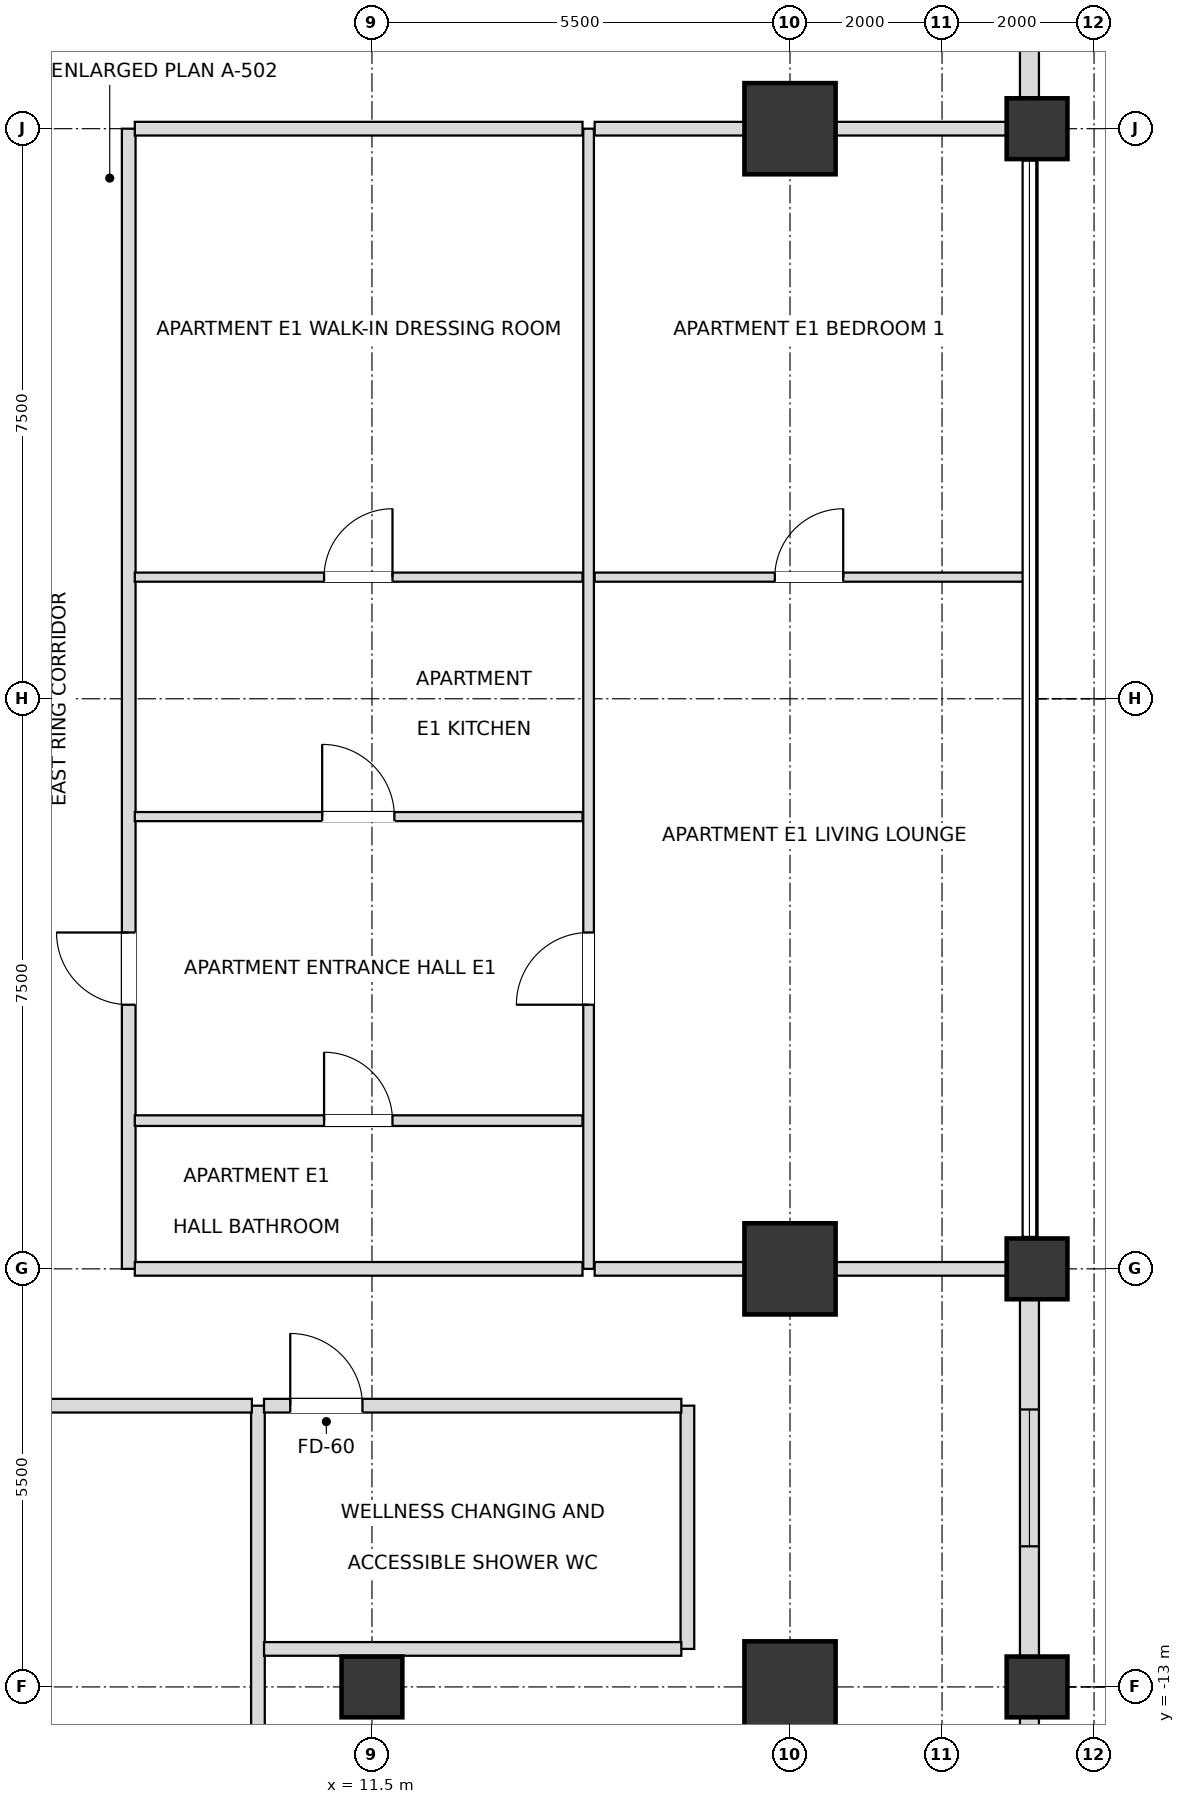
"""IFC4 building model, lengths in metres.
Left out: names, types, materials, properties, quantities, classifications, styles, units other than length and angle.
Written with IfcOpenShell. Run it as: python <this file> out.ifc"""

import sys

from ifc_helpers import new_model, si_unit, direction, frame, frame_2d, origin, origin_2d, place, context, subcontext, project, spatial, rectangle, extrude, element, fill, save


model = new_model("IFC4")
c1 = context("Model", 3, precision=1e-05, world=origin(), true_north=direction((0.0, 1.0)))
c2 = subcontext(c1, "Body", "Model", "MODEL_VIEW")
j1 = project(units=[si_unit("LENGTHUNIT", "METRE"), si_unit("PLANEANGLEUNIT", "RADIAN")], contexts=[c1])
p1 = place(None, origin())
s1 = spatial("IfcSite", under=j1, at=p1, CompositionType="ELEMENT")
p2 = place(p1, origin())
s2 = spatial("IfcBuilding", under=s1, at=p2, CompositionType="ELEMENT")
p3 = place(p2, frame((0.0, 0.0, 109.8)))
s3 = spatial("IfcBuildingStorey", under=s2, at=p3, CompositionType="ELEMENT", Elevation=109.8)
for number, where, z_axis, x_axis in (
    (1, (17.0, -13.0, 0.0), (0.0, 0.0, 1.0), (1.0, 0.0, 0.0)),
    (2, (17.0, -7.5, 0.0), (0.0, 0.0, 1.0), (1.0, 0.0, 0.0)),
    (3, (17.0, 7.5, 0.0), (0.0, 0.0, 1.0), (1.0, 0.0, 0.0)),
):
    element("IfcColumn", number, at=place(p3, frame(where, z_axis=z_axis, x_axis=x_axis)), inside=s3, PredefinedType="USERDEFINED", context=c2, shape_type="SweptSolid", body=[
        extrude(rectangle(XDim=1.2, YDim=1.2, at=origin_2d()), origin(), (0.0, 0.0, 1.0), 3.6),
    ])
for number, where, z_axis, x_axis in (
    (4, (11.5, -13.0, 0.0), (0.0, 0.0, 1.0), (1.0, 0.0, 0.0)),
    (5, (20.25, -13.0, 0.0), (0.0, 0.0, 1.0), (1.0, 0.0, 0.0)),
    (6, (20.25, -7.5, 0.0), (0.0, 0.0, 1.0), (1.0, 0.0, 0.0)),
    (7, (20.25, 7.5, 0.0), (0.0, 0.0, 1.0), (1.0, 0.0, 0.0)),
):
    element("IfcColumn", number, at=place(p3, frame(where, z_axis=z_axis, x_axis=x_axis)), inside=s3, PredefinedType="COLUMN", context=c2, shape_type="SweptSolid", body=[
        extrude(rectangle(XDim=0.8, YDim=0.8, at=origin_2d()), origin(), (0.0, 0.0, 1.0), 3.6),
    ])
p4 = place(p3, frame((20.15, -18.675, 0.0), z_axis=(0.0, 0.0, 1.0), x_axis=(0.0, 1.0, 0.0)))
e8 = element("IfcWall", 8, at=p4, inside=s3, PredefinedType="SOLIDWALL", context=c2, shape_type="SweptSolid", body=[
    extrude(rectangle(XDim=5.28, YDim=0.25, at=frame_2d((2.64, 0.0))), origin(), (0.0, 0.0, 1.0), 2.736),
])
p5 = place(p4, frame((1.718, 0.0, 0.72)))
e9 = element("IfcOpeningElement", 9, at=p5, cuts=e8, PredefinedType="OPENING", context=c2, shape_type="SweptSolid", body=[
    extrude(rectangle(XDim=1.8, YDim=1.68, at=frame_2d((0.9, 0.84))), frame((0.0, 0.135, 0.0), z_axis=(0.0, -1.0, 0.0), x_axis=(1.0, 0.0, 0.0)), (0.0, 0.0, 1.0), 0.27),
])
p6 = place(p3, frame((20.15, -12.605, 0.0), z_axis=(0.0, 0.0, 1.0), x_axis=(0.0, 1.0, 0.0)))
e10 = element("IfcWall", 10, at=p6, inside=s3, PredefinedType="SOLIDWALL", context=c2, shape_type="SweptSolid", body=[
    extrude(rectangle(XDim=4.71, YDim=0.25, at=frame_2d((2.355, 0.0))), origin(), (0.0, 0.0, 1.0), 2.736),
])
p7 = place(p6, frame((1.455, 0.0, 0.72)))
e11 = element("IfcOpeningElement", 11, at=p7, cuts=e10, PredefinedType="OPENING", context=c2, shape_type="SweptSolid", body=[
    extrude(rectangle(XDim=1.8, YDim=1.68, at=frame_2d((0.9, 0.84))), frame((0.0, 0.135, 0.0), z_axis=(0.0, -1.0, 0.0), x_axis=(1.0, 0.0, 0.0)), (0.0, 0.0, 1.0), 0.27),
])
p8 = place(p3, frame((20.15, 7.895, 0.0), z_axis=(0.0, 0.0, 1.0), x_axis=(0.0, 1.0, 0.0)))
e12 = element("IfcWall", 12, at=p8, inside=s3, PredefinedType="SOLIDWALL", context=c2, shape_type="SweptSolid", body=[
    extrude(rectangle(XDim=4.71, YDim=0.25, at=frame_2d((2.355, 0.0))), origin(), (0.0, 0.0, 1.0), 2.736),
])
p9 = place(p8, frame((1.455, 0.0, 0.72)))
e13 = element("IfcOpeningElement", 13, at=p9, cuts=e12, PredefinedType="OPENING", context=c2, shape_type="SweptSolid", body=[
    extrude(rectangle(XDim=1.8, YDim=1.68, at=frame_2d((0.9, 0.84))), frame((0.0, 0.135, 0.0), z_axis=(0.0, -1.0, 0.0), x_axis=(1.0, 0.0, 0.0)), (0.0, 0.0, 1.0), 0.27),
])
p10 = place(p3, frame((8.3, -7.5, 0.0), z_axis=(0.0, 0.0, 1.0), x_axis=(0.0, 1.0, 0.0)))
e14 = element("IfcWall", 14, at=p10, inside=s3, PredefinedType="PARTITIONING", context=c2, shape_type="SweptSolid", body=[
    extrude(rectangle(XDim=15.0, YDim=0.18, at=frame_2d((7.5, 0.0))), origin(), (0.0, 0.0, 1.0), 3.38),
])
p11 = place(p10, frame((3.475, 0.0, 0.0)))
e15 = element("IfcOpeningElement", 15, at=p11, cuts=e14, PredefinedType="OPENING", context=c2, shape_type="SweptSolid", body=[
    extrude(rectangle(XDim=0.95, YDim=2.15, at=frame_2d((0.475, 1.075))), frame((0.0, 0.1, 0.0), z_axis=(0.0, -1.0, 0.0), x_axis=(1.0, 0.0, 0.0)), (0.0, 0.0, 1.0), 0.2),
])
p12 = place(p3, frame((10.0, -23.15, 0.0), z_axis=(0.0, 0.0, 1.0), x_axis=(0.0, 1.0, 0.0)))
e16 = element("IfcWall", 16, at=p12, inside=s3, PredefinedType="PARTITIONING", context=c2, shape_type="SweptSolid", body=[
    extrude(rectangle(XDim=13.85, YDim=0.18, at=frame_2d((6.925, 0.0))), origin(), (0.0, 0.0, 1.0), 2.816),
])
p13 = place(p12, frame((4.855, 0.0, 0.0)))
e17 = element("IfcOpeningElement", 17, at=p13, cuts=e16, PredefinedType="OPENING", context=c2, shape_type="SweptSolid", body=[
    extrude(rectangle(XDim=0.95, YDim=2.15, at=frame_2d((0.475, 1.075))), frame((0.0, 0.1, 0.0), z_axis=(0.0, -1.0, 0.0), x_axis=(1.0, 0.0, 0.0)), (0.0, 0.0, 1.0), 0.2),
])
p14 = place(p3, frame((14.35, -7.5, 0.0), z_axis=(0.0, 0.0, 1.0), x_axis=(0.0, 1.0, 0.0)))
e18 = element("IfcWall", 18, at=p14, inside=s3, PredefinedType="PARTITIONING", context=c2, shape_type="SweptSolid", body=[
    extrude(rectangle(XDim=15.0, YDim=0.14, at=frame_2d((7.5, 0.0))), origin(), (0.0, 0.0, 1.0), 3.38),
])
p15 = place(p14, frame((3.475, 0.0, 0.0)))
e19 = element("IfcOpeningElement", 19, at=p15, cuts=e18, PredefinedType="OPENING", context=c2, shape_type="SweptSolid", body=[
    extrude(rectangle(XDim=0.95, YDim=2.1, at=frame_2d((0.475, 1.05))), frame((0.0, 0.08, 0.0), z_axis=(0.0, -1.0, 0.0), x_axis=(1.0, 0.0, 0.0)), (0.0, 0.0, 1.0), 0.16),
])
p16 = place(p3, frame((15.65, -12.5, 0.0), z_axis=(0.0, 0.0, 1.0), x_axis=(0.0, 1.0, 0.0)))
e20 = element("IfcWall", 20, at=p16, inside=s3, PredefinedType="PARTITIONING", context=c2, shape_type="SweptSolid", body=[
    extrude(rectangle(XDim=3.2, YDim=0.18, at=frame_2d((1.6, 0.0))), origin(), (0.0, 0.0, 1.0), 3.38),
])
p17 = place(p3, frame((10.08, -12.5, 0.0), z_axis=(0.0, 0.0, 1.0), x_axis=(1.0, 0.0, 0.0)))
e21 = element("IfcWall", 21, at=p17, inside=s3, PredefinedType="PARTITIONING", context=c2, shape_type="SweptSolid", body=[
    extrude(rectangle(XDim=5.49, YDim=0.18, at=frame_2d((2.745, 0.0))), origin(), (0.0, 0.0, 1.0), 3.38),
])
p18 = place(p3, frame((-4.92, -9.3, 0.0), z_axis=(0.0, 0.0, 1.0), x_axis=(1.0, 0.0, 0.0)))
e22 = element("IfcWall", 22, at=p18, inside=s3, PredefinedType="PARTITIONING", context=c2, shape_type="SweptSolid", body=[
    extrude(rectangle(XDim=14.84, YDim=0.18, at=frame_2d((7.42, 0.0))), origin(), (0.0, 0.0, 1.0), 2.816),
])
p19 = place(p18, frame((6.945, 0.0, 0.0)))
e23 = element("IfcOpeningElement", 23, at=p19, cuts=e22, PredefinedType="OPENING", context=c2, shape_type="SweptSolid", body=[
    extrude(rectangle(XDim=0.95, YDim=2.15, at=frame_2d((0.475, 1.075))), frame((0.0, 0.1, 0.0), z_axis=(0.0, -1.0, 0.0), x_axis=(1.0, 0.0, 0.0)), (0.0, 0.0, 1.0), 0.2),
])
p20 = place(p3, frame((10.08, -9.3, 0.0), z_axis=(0.0, 0.0, 1.0), x_axis=(1.0, 0.0, 0.0)))
e24 = element("IfcWall", 24, at=p20, inside=s3, PredefinedType="PARTITIONING", context=c2, shape_type="SweptSolid", body=[
    extrude(rectangle(XDim=5.49, YDim=0.18, at=frame_2d((2.745, 0.0))), origin(), (0.0, 0.0, 1.0), 3.38),
])
p21 = place(p20, frame((0.345, 0.0, 0.0)))
e25 = element("IfcOpeningElement", 25, at=p21, cuts=e24, PredefinedType="OPENING", context=c2, shape_type="SweptSolid", body=[
    extrude(rectangle(XDim=0.95, YDim=2.15, at=frame_2d((0.475, 1.075))), frame((0.0, 0.1, 0.0), z_axis=(0.0, -1.0, 0.0), x_axis=(1.0, 0.0, 0.0)), (0.0, 0.0, 1.0), 0.2),
])
p22 = place(p3, frame((8.38, -7.5, 0.0), z_axis=(0.0, 0.0, 1.0), x_axis=(1.0, 0.0, 0.0)))
e26 = element("IfcWall", 26, at=p22, inside=s3, PredefinedType="PARTITIONING", context=c2, shape_type="SweptSolid", body=[
    extrude(rectangle(XDim=5.89, YDim=0.18, at=frame_2d((2.945, 0.0))), origin(), (0.0, 0.0, 1.0), 2.816),
])
p23 = place(p3, frame((14.43, -7.5, 0.0), z_axis=(0.0, 0.0, 1.0), x_axis=(1.0, 0.0, 0.0)))
e27 = element("IfcWall", 27, at=p23, inside=s3, PredefinedType="PARTITIONING", context=c2, shape_type="SweptSolid", body=[
    extrude(rectangle(XDim=5.72, YDim=0.18, at=frame_2d((2.86, 0.0))), origin(), (0.0, 0.0, 1.0), 2.816),
])
p24 = place(p3, frame((8.38, -5.55, 0.0), z_axis=(0.0, 0.0, 1.0), x_axis=(1.0, 0.0, 0.0)))
e28 = element("IfcWall", 28, at=p24, inside=s3, PredefinedType="PARTITIONING", context=c2, shape_type="SweptSolid", body=[
    extrude(rectangle(XDim=5.89, YDim=0.14, at=frame_2d((2.945, 0.0))), origin(), (0.0, 0.0, 1.0), 3.38),
])
p25 = place(p24, frame((2.49, 0.0, 0.0)))
e29 = element("IfcOpeningElement", 29, at=p25, cuts=e28, PredefinedType="OPENING", context=c2, shape_type="SweptSolid", body=[
    extrude(rectangle(XDim=0.9, YDim=2.1, at=frame_2d((0.45, 1.05))), frame((0.0, 0.08, 0.0), z_axis=(0.0, -1.0, 0.0), x_axis=(1.0, 0.0, 0.0)), (0.0, 0.0, 1.0), 0.16),
])
p26 = place(p3, frame((8.38, -1.55, 0.0), z_axis=(0.0, 0.0, 1.0), x_axis=(1.0, 0.0, 0.0)))
e30 = element("IfcWall", 30, at=p26, inside=s3, PredefinedType="PARTITIONING", context=c2, shape_type="SweptSolid", body=[
    extrude(rectangle(XDim=5.89, YDim=0.12, at=frame_2d((2.945, 0.0))), origin(), (0.0, 0.0, 1.0), 3.38),
])
p27 = place(p26, frame((2.465, 0.0, 0.0)))
e31 = element("IfcOpeningElement", 31, at=p27, cuts=e30, PredefinedType="OPENING", context=c2, shape_type="SweptSolid", body=[
    extrude(rectangle(XDim=0.95, YDim=2.1, at=frame_2d((0.475, 1.05))), frame((0.0, 0.07, 0.0), z_axis=(0.0, -1.0, 0.0), x_axis=(1.0, 0.0, 0.0)), (0.0, 0.0, 1.0), 0.14),
])
p28 = place(p3, frame((8.38, 1.6, 0.0), z_axis=(0.0, 0.0, 1.0), x_axis=(1.0, 0.0, 0.0)))
e32 = element("IfcWall", 32, at=p28, inside=s3, PredefinedType="PARTITIONING", context=c2, shape_type="SweptSolid", body=[
    extrude(rectangle(XDim=5.89, YDim=0.12, at=frame_2d((2.945, 0.0))), origin(), (0.0, 0.0, 1.0), 3.38),
])
p29 = place(p28, frame((2.49, 0.0, 0.0)))
e33 = element("IfcOpeningElement", 33, at=p29, cuts=e32, PredefinedType="OPENING", context=c2, shape_type="SweptSolid", body=[
    extrude(rectangle(XDim=0.9, YDim=2.1, at=frame_2d((0.45, 1.05))), frame((0.0, 0.07, 0.0), z_axis=(0.0, -1.0, 0.0), x_axis=(1.0, 0.0, 0.0)), (0.0, 0.0, 1.0), 0.14),
])
p30 = place(p3, frame((14.43, 1.6, 0.0), z_axis=(0.0, 0.0, 1.0), x_axis=(1.0, 0.0, 0.0)))
e34 = element("IfcWall", 34, at=p30, inside=s3, PredefinedType="PARTITIONING", context=c2, shape_type="SweptSolid", body=[
    extrude(rectangle(XDim=5.64, YDim=0.12, at=frame_2d((2.82, 0.0))), origin(), (0.0, 0.0, 1.0), 2.816),
])
p31 = place(p30, frame((2.37, 0.0, 0.0)))
e35 = element("IfcOpeningElement", 35, at=p31, cuts=e34, PredefinedType="OPENING", context=c2, shape_type="SweptSolid", body=[
    extrude(rectangle(XDim=0.9, YDim=2.1, at=frame_2d((0.45, 1.05))), frame((0.0, 0.07, 0.0), z_axis=(0.0, -1.0, 0.0), x_axis=(1.0, 0.0, 0.0)), (0.0, 0.0, 1.0), 0.14),
])
p32 = place(p3, frame((8.38, 7.5, 0.0), z_axis=(0.0, 0.0, 1.0), x_axis=(1.0, 0.0, 0.0)))
e36 = element("IfcWall", 36, at=p32, inside=s3, PredefinedType="PARTITIONING", context=c2, shape_type="SweptSolid", body=[
    extrude(rectangle(XDim=5.89, YDim=0.18, at=frame_2d((2.945, 0.0))), origin(), (0.0, 0.0, 1.0), 2.816),
])
p33 = place(p3, frame((14.43, 7.5, 0.0), z_axis=(0.0, 0.0, 1.0), x_axis=(1.0, 0.0, 0.0)))
e37 = element("IfcWall", 37, at=p33, inside=s3, PredefinedType="PARTITIONING", context=c2, shape_type="SweptSolid", body=[
    extrude(rectangle(XDim=5.72, YDim=0.18, at=frame_2d((2.86, 0.0))), origin(), (0.0, 0.0, 1.0), 2.816),
])
p34 = place(p7, origin())
e38 = element("IfcWindow", 38, at=p34, inside=s3, PartitioningType="SINGLE_PANEL", PredefinedType="WINDOW", context=c2, shape_type="SweptSolid", body=[
    extrude(rectangle(XDim=1.8, YDim=1.68, at=frame_2d((0.9, 0.84))), frame((0.0, 0.03, 0.0), z_axis=(0.0, -1.0, 0.0), x_axis=(1.0, 0.0, 0.0)), (0.0, 0.0, 1.0), 0.06),
])
fill(e11, e38)
p35 = place(p21, origin())
e39 = element("IfcDoor", 39, at=p35, inside=s3, OperationType="SINGLE_SWING_LEFT", PredefinedType="DOOR", context=c2, shape_type="SweptSolid", body=[
    extrude(rectangle(XDim=0.95, YDim=2.15, at=frame_2d((0.475, 1.075))), frame((0.0, 0.025, 0.0), z_axis=(0.0, -1.0, 0.0), x_axis=(1.0, 0.0, 0.0)), (0.0, 0.0, 1.0), 0.05),
])
fill(e25, e39)
p36 = place(p25, origin())
e40 = element("IfcDoor", 40, at=p36, inside=s3, OperationType="SINGLE_SWING_LEFT", PredefinedType="DOOR", context=c2, shape_type="SweptSolid", body=[
    extrude(rectangle(XDim=0.9, YDim=2.1, at=frame_2d((0.45, 1.05))), frame((0.0, 0.025, 0.0), z_axis=(0.0, -1.0, 0.0), x_axis=(1.0, 0.0, 0.0)), (0.0, 0.0, 1.0), 0.05),
])
fill(e29, e40)
p37 = place(p11, origin())
e41 = element("IfcDoor", 41, at=p37, inside=s3, OperationType="SINGLE_SWING_RIGHT", PredefinedType="DOOR", context=c2, shape_type="SweptSolid", body=[
    extrude(rectangle(XDim=0.95, YDim=2.15, at=frame_2d((0.475, 1.075))), frame((0.0, 0.025, 0.0), z_axis=(0.0, -1.0, 0.0), x_axis=(1.0, 0.0, 0.0)), (0.0, 0.0, 1.0), 0.05),
])
fill(e15, e41)
p38 = place(p27, origin())
e42 = element("IfcDoor", 42, at=p38, inside=s3, OperationType="SINGLE_SWING_LEFT", PredefinedType="DOOR", context=c2, shape_type="SweptSolid", body=[
    extrude(rectangle(XDim=0.95, YDim=2.1, at=frame_2d((0.475, 1.05))), frame((0.0, 0.025, 0.0), z_axis=(0.0, -1.0, 0.0), x_axis=(1.0, 0.0, 0.0)), (0.0, 0.0, 1.0), 0.05),
])
fill(e31, e42)
p39 = place(p29, origin())
e43 = element("IfcDoor", 43, at=p39, inside=s3, OperationType="SINGLE_SWING_RIGHT", PredefinedType="DOOR", context=c2, shape_type="SweptSolid", body=[
    extrude(rectangle(XDim=0.9, YDim=2.1, at=frame_2d((0.45, 1.05))), frame((0.0, 0.025, 0.0), z_axis=(0.0, -1.0, 0.0), x_axis=(1.0, 0.0, 0.0)), (0.0, 0.0, 1.0), 0.05),
])
fill(e33, e43)
p40 = place(p15, origin())
e44 = element("IfcDoor", 44, at=p40, inside=s3, OperationType="SINGLE_SWING_LEFT", PredefinedType="DOOR", context=c2, shape_type="SweptSolid", body=[
    extrude(rectangle(XDim=0.95, YDim=2.1, at=frame_2d((0.475, 1.05))), frame((0.0, 0.025, 0.0), z_axis=(0.0, -1.0, 0.0), x_axis=(1.0, 0.0, 0.0)), (0.0, 0.0, 1.0), 0.05),
])
fill(e19, e44)
p41 = place(p31, origin())
e45 = element("IfcDoor", 45, at=p41, inside=s3, OperationType="SINGLE_SWING_RIGHT", PredefinedType="DOOR", context=c2, shape_type="SweptSolid", body=[
    extrude(rectangle(XDim=0.9, YDim=2.1, at=frame_2d((0.45, 1.05))), frame((0.0, 0.025, 0.0), z_axis=(0.0, -1.0, 0.0), x_axis=(1.0, 0.0, 0.0)), (0.0, 0.0, 1.0), 0.05),
])
fill(e35, e45)
save(model, sys.argv[1])
